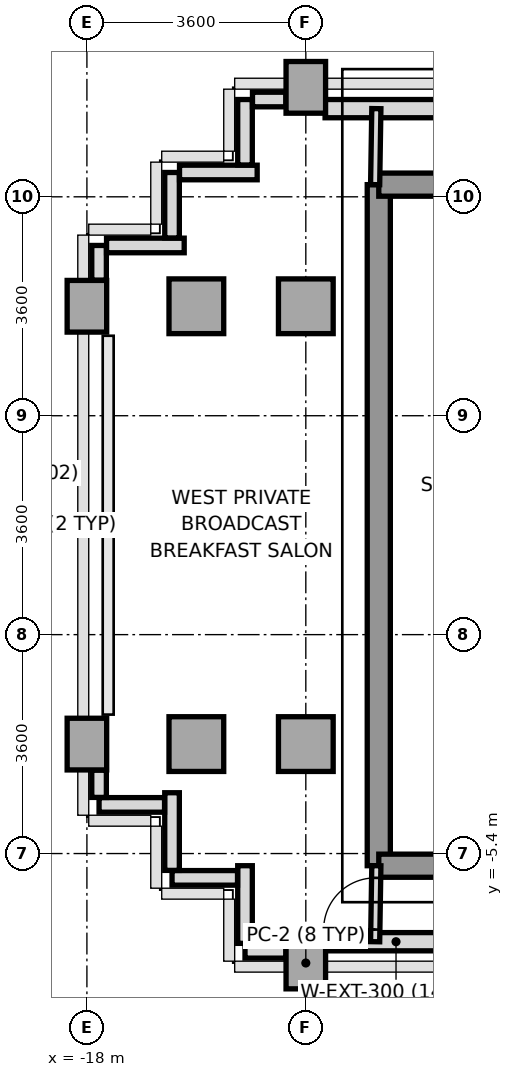
"""IFC4 building model, lengths in metres.
Left out: names, types, materials, properties, quantities, classifications, styles, units other than length and angle.
Written with IfcOpenShell. Run it as: python <this file> out.ifc"""

import sys

from ifc_helpers import new_model, si_unit, direction, frame, frame_2d, origin, origin_2d, place, context, subcontext, project, spatial, rectangle, extrude, source, transform, mapped, element, fill, save


model = new_model("IFC4")
c1 = context("Model", 3, precision=1e-05, world=origin(), true_north=direction((0.0, 1.0)))
c2 = subcontext(c1, "Body", "Model", "MODEL_VIEW")
j1 = project(units=[si_unit("LENGTHUNIT", "METRE"), si_unit("PLANEANGLEUNIT", "RADIAN")], contexts=[c1])
p1 = place(None, origin())
s1 = spatial("IfcSite", under=j1, at=p1, CompositionType="ELEMENT")
p2 = place(p1, origin())
s2 = spatial("IfcBuilding", under=s1, at=p2, CompositionType="ELEMENT")
p3 = place(p2, frame((0.0, 0.0, 201.2)))
s3 = spatial("IfcBuildingStorey", under=s2, at=p3, CompositionType="ELEMENT", Elevation=201.2)
m1 = source(origin(), c2, "Body", "SweptSolid", [
    extrude(rectangle(XDim=0.65, YDim=0.85, at=origin_2d()), origin(), (0.0, 0.0, 1.0), 3.2),
])
for number, where, z_axis, x_axis in (
    (1, (-18.0, -3.6, 0.0), (0.0, 0.0, 1.0), (1.0, 0.0, 0.0)),
    (2, (-18.0, 3.6, 0.0), (0.0, 0.0, 1.0), (1.0, 0.0, 0.0)),
):
    element("IfcColumn", number, at=place(p3, frame(where, z_axis=z_axis, x_axis=x_axis)), inside=s3, PredefinedType="COLUMN", context=c2, shape_type="MappedRepresentation", body=[
        mapped(m1, transform((0.0, 0.0, 0.0), x_axis=(1.0, 0.0, 0.0), y_axis=(0.0, 1.0, 0.0), z_axis=(0.0, 0.0, 1.0), scale=1.0)),
    ])
m2 = source(origin(), c2, "Body", "SweptSolid", [
    extrude(rectangle(XDim=0.9, YDim=0.9, at=origin_2d()), origin(), (0.0, 0.0, 1.0), 3.2),
])
for number, where, z_axis, x_axis in (
    (3, (-16.2, -3.6, 0.0), (0.0, 0.0, 1.0), (1.0, 0.0, 0.0)),
    (4, (-16.2, 3.6, 0.0), (0.0, 0.0, 1.0), (1.0, 0.0, 0.0)),
):
    element("IfcColumn", number, at=place(p3, frame(where, z_axis=z_axis, x_axis=x_axis)), inside=s3, PredefinedType="COLUMN", context=c2, shape_type="MappedRepresentation", body=[
        mapped(m2, transform((0.0, 0.0, 0.0), x_axis=(1.0, 0.0, 0.0), y_axis=(0.0, 1.0, 0.0), z_axis=(0.0, 0.0, 1.0), scale=1.0)),
    ])
p4 = place(p3, frame((-14.4, -7.2, 0.0), z_axis=(0.0, 0.0, 1.0), x_axis=(1.0, 0.0, 0.0)))
e5 = element("IfcColumn", 5, at=p4, inside=s3, PredefinedType="COLUMN", context=c2, shape_type="MappedRepresentation", body=[
    mapped(m1, transform((0.0, 0.0, 0.0), x_axis=(1.0, 0.0, 0.0), y_axis=(0.0, 1.0, 0.0), z_axis=(0.0, 0.0, 1.0), scale=1.0)),
])
for number, where, z_axis, x_axis in (
    (6, (-14.4, -3.6, 0.0), (0.0, 0.0, 1.0), (1.0, 0.0, 0.0)),
    (7, (-14.4, 3.6, 0.0), (0.0, 0.0, 1.0), (1.0, 0.0, 0.0)),
):
    element("IfcColumn", number, at=place(p3, frame(where, z_axis=z_axis, x_axis=x_axis)), inside=s3, PredefinedType="COLUMN", context=c2, shape_type="MappedRepresentation", body=[
        mapped(m2, transform((0.0, 0.0, 0.0), x_axis=(1.0, 0.0, 0.0), y_axis=(0.0, 1.0, 0.0), z_axis=(0.0, 0.0, 1.0), scale=1.0)),
    ])
p5 = place(p3, frame((-14.4, 7.2, 0.0), z_axis=(0.0, 0.0, 1.0), x_axis=(1.0, 0.0, 0.0)))
e8 = element("IfcColumn", 8, at=p5, inside=s3, PredefinedType="COLUMN", context=c2, shape_type="MappedRepresentation", body=[
    mapped(m1, transform((0.0, 0.0, 0.0), x_axis=(1.0, 0.0, 0.0), y_axis=(0.0, 1.0, 0.0), z_axis=(0.0, 0.0, 1.0), scale=1.0)),
])
p6 = place(p3, frame((-14.083, 6.85, 0.0), z_axis=(0.0, 0.0, 1.0), x_axis=(1.0, 0.0, 0.0)))
e9 = element("IfcWall", 9, at=p6, inside=s3, PredefinedType="SOLIDWALL", context=c2, shape_type="SweptSolid", body=[
    extrude(rectangle(XDim=2.635, YDim=0.3, at=frame_2d((1.317, 0.0))), origin(), (0.0, 0.0, 1.0), 3.2),
])
p7 = place(p3, frame((-14.083, -6.85, 0.0), z_axis=(0.0, 0.0, 1.0), x_axis=(1.0, 0.0, 0.0)))
e10 = element("IfcWall", 10, at=p7, inside=s3, PredefinedType="SOLIDWALL", context=c2, shape_type="SweptSolid", body=[
    extrude(rectangle(XDim=2.333, YDim=0.3, at=frame_2d((1.167, 0.0))), origin(), (0.0, 0.0, 1.0), 3.2),
])
p8 = place(p3, frame((-14.728, -7.0, 0.0), z_axis=(0.0, 0.0, 1.0), x_axis=(-1.0, 0.0, 0.0)))
e11 = element("IfcWall", 11, at=p8, inside=s3, PredefinedType="PARAPET", context=c2, shape_type="SweptSolid", body=[
    extrude(rectangle(XDim=0.672, YDim=0.24, at=frame_2d((0.336, 0.0))), origin(), (0.0, 0.0, 1.0), 1.15),
])
p9 = place(p3, frame((-15.4, -6.877, 0.0), z_axis=(0.0, 0.0, 1.0), x_axis=(0.0, 1.0, 0.0)))
e12 = element("IfcWall", 12, at=p9, inside=s3, PredefinedType="PARAPET", context=c2, shape_type="SweptSolid", body=[
    extrude(rectangle(XDim=1.277, YDim=0.24, at=frame_2d((0.638, 0.0))), origin(), (0.0, 0.0, 1.0), 1.15),
])
p10 = place(p3, frame((-15.523, -5.8, 0.0), z_axis=(0.0, 0.0, 1.0), x_axis=(-1.0, 0.0, 0.0)))
e13 = element("IfcWall", 13, at=p10, inside=s3, PredefinedType="PARAPET", context=c2, shape_type="SweptSolid", body=[
    extrude(rectangle(XDim=1.077, YDim=0.24, at=frame_2d((0.539, 0.0))), origin(), (0.0, 0.0, 1.0), 1.15),
])
p11 = place(p3, frame((-16.6, -5.677, 0.0), z_axis=(0.0, 0.0, 1.0), x_axis=(0.0, 1.0, 0.0)))
e14 = element("IfcWall", 14, at=p11, inside=s3, PredefinedType="PARAPET", context=c2, shape_type="SweptSolid", body=[
    extrude(rectangle(XDim=1.277, YDim=0.24, at=frame_2d((0.639, 0.0))), origin(), (0.0, 0.0, 1.0), 1.15),
])
p12 = place(p3, frame((-16.723, -4.6, 0.0), z_axis=(0.0, 0.0, 1.0), x_axis=(-1.0, 0.0, 0.0)))
e15 = element("IfcWall", 15, at=p12, inside=s3, PredefinedType="PARAPET", context=c2, shape_type="SweptSolid", body=[
    extrude(rectangle(XDim=1.077, YDim=0.24, at=frame_2d((0.539, 0.0))), origin(), (0.0, 0.0, 1.0), 1.15),
])
p13 = place(p3, frame((-17.8, -4.477, 0.0), z_axis=(0.0, 0.0, 1.0), x_axis=(0.0, 1.0, 0.0)))
e16 = element("IfcWall", 16, at=p13, inside=s3, PredefinedType="PARAPET", context=c2, shape_type="SweptSolid", body=[
    extrude(rectangle(XDim=0.449, YDim=0.24, at=frame_2d((0.225, 0.0))), origin(), (0.0, 0.0, 1.0), 1.15),
])
p14 = place(p3, frame((-17.8, 4.028, 0.0), z_axis=(0.0, 0.0, 1.0), x_axis=(0.0, 1.0, 0.0)))
e17 = element("IfcWall", 17, at=p14, inside=s3, PredefinedType="PARAPET", context=c2, shape_type="SweptSolid", body=[
    extrude(rectangle(XDim=0.572, YDim=0.24, at=frame_2d((0.286, 0.0))), origin(), (0.0, 0.0, 1.0), 1.15),
])
p15 = place(p3, frame((-17.677, 4.6, 0.0), z_axis=(0.0, 0.0, 1.0), x_axis=(1.0, 0.0, 0.0)))
e18 = element("IfcWall", 18, at=p15, inside=s3, PredefinedType="PARAPET", context=c2, shape_type="SweptSolid", body=[
    extrude(rectangle(XDim=1.277, YDim=0.24, at=frame_2d((0.639, 0.0))), origin(), (0.0, 0.0, 1.0), 1.15),
])
p16 = place(p3, frame((-16.6, 4.723, 0.0), z_axis=(0.0, 0.0, 1.0), x_axis=(0.0, 1.0, 0.0)))
e19 = element("IfcWall", 19, at=p16, inside=s3, PredefinedType="PARAPET", context=c2, shape_type="SweptSolid", body=[
    extrude(rectangle(XDim=1.077, YDim=0.24, at=frame_2d((0.539, 0.0))), origin(), (0.0, 0.0, 1.0), 1.15),
])
p17 = place(p3, frame((-16.477, 5.8, 0.0), z_axis=(0.0, 0.0, 1.0), x_axis=(1.0, 0.0, 0.0)))
e20 = element("IfcWall", 20, at=p17, inside=s3, PredefinedType="PARAPET", context=c2, shape_type="SweptSolid", body=[
    extrude(rectangle(XDim=1.277, YDim=0.24, at=frame_2d((0.639, 0.0))), origin(), (0.0, 0.0, 1.0), 1.15),
])
p18 = place(p3, frame((-15.4, 5.923, 0.0), z_axis=(0.0, 0.0, 1.0), x_axis=(0.0, 1.0, 0.0)))
e21 = element("IfcWall", 21, at=p18, inside=s3, PredefinedType="PARAPET", context=c2, shape_type="SweptSolid", body=[
    extrude(rectangle(XDim=1.077, YDim=0.24, at=frame_2d((0.539, 0.0))), origin(), (0.0, 0.0, 1.0), 1.15),
])
p19 = place(p3, frame((-15.277, 7.0, 0.0), z_axis=(0.0, 0.0, 1.0), x_axis=(1.0, 0.0, 0.0)))
e22 = element("IfcWall", 22, at=p19, inside=s3, PredefinedType="PARAPET", context=c2, shape_type="SweptSolid", body=[
    extrude(rectangle(XDim=0.549, YDim=0.24, at=frame_2d((0.274, 0.0))), origin(), (0.0, 0.0, 1.0), 1.15),
])
p20 = place(p3, frame((-13.2, -5.6, 0.0), z_axis=(0.0, 0.0, 1.0), x_axis=(0.0, 1.0, 0.0)))
e23 = element("IfcWall", 23, at=p20, inside=s3, PredefinedType="SHEAR", context=c2, shape_type="SweptSolid", body=[
    extrude(rectangle(XDim=11.2, YDim=0.38, at=frame_2d((5.6, 0.0))), origin(), (0.0, 0.0, 1.0), 3.2),
])
p21 = place(p3, frame((-13.2, 5.6, 0.0), z_axis=(0.0, 0.0, 1.0), x_axis=(1.0, 0.0, 0.0)))
e24 = element("IfcWall", 24, at=p21, inside=s3, PredefinedType="SHEAR", context=c2, shape_type="SweptSolid", body=[
    extrude(rectangle(XDim=1.844, YDim=0.38, at=frame_2d((0.922, 0.0))), origin(), (0.0, 0.0, 1.0), 3.2),
])
p22 = place(p3, frame((-13.2, -5.6, 0.0), z_axis=(0.0, 0.0, 1.0), x_axis=(1.0, 0.0, 0.0)))
e25 = element("IfcWall", 25, at=p22, inside=s3, PredefinedType="SHEAR", context=c2, shape_type="SweptSolid", body=[
    extrude(rectangle(XDim=7.8, YDim=0.38, at=frame_2d((3.9, 0.0))), origin(), (0.0, 0.0, 1.0), 3.2),
])
p23 = place(p3, frame((-13.26, 5.6, 0.0), z_axis=(0.0, 0.0, 1.0), x_axis=(0.016013571389, 0.999871774545, 0.0)))
e26 = element("IfcWall", 26, at=p23, inside=s3, PredefinedType="PARTITIONING", context=c2, shape_type="SweptSolid", body=[
    extrude(rectangle(XDim=1.25, YDim=0.15, at=frame_2d((0.625, 0.0))), origin(), (0.0, 0.0, 1.0), 3.2),
])
p24 = place(p3, frame((-13.26, -6.85, 0.0), z_axis=(0.0, 0.0, 1.0), x_axis=(0.016013571389, 0.999871774545, 0.0)))
e27 = element("IfcWall", 27, at=p24, inside=s3, PredefinedType="PARTITIONING", context=c2, shape_type="SweptSolid", body=[
    extrude(rectangle(XDim=1.25, YDim=0.15, at=frame_2d((0.625, 0.0))), origin(), (0.0, 0.0, 1.0), 3.2),
])
p25 = place(p24, frame((0.2, 0.0, 0.0)))
e28 = element("IfcOpeningElement", 28, at=p25, cuts=e27, PredefinedType="OPENING", context=c2, shape_type="SweptSolid", body=[
    extrude(rectangle(XDim=0.85, YDim=2.1, at=frame_2d((0.425, 1.05))), frame((0.0, 0.085, 0.0), z_axis=(0.0, -1.0, 0.0), x_axis=(1.0, 0.0, 0.0)), (0.0, 0.0, 1.0), 0.17),
])
m3 = source(origin(), c2, "Body", "SweptSolid", [
    extrude(rectangle(XDim=0.85, YDim=2.1, at=frame_2d((0.425, 1.05))), frame((0.0, 0.025, 0.0), z_axis=(0.0, -1.0, 0.0), x_axis=(1.0, 0.0, 0.0)), (0.0, 0.0, 1.0), 0.05),
])
p26 = place(p25, origin())
e29 = element("IfcDoor", 29, at=p26, inside=s3, OperationType="SINGLE_SWING_LEFT", PredefinedType="DOOR", context=c2, shape_type="MappedRepresentation", body=[
    mapped(m3, transform((0.0, 0.0, 0.0), x_axis=(1.0, 0.0, 0.0), y_axis=(0.0, 1.0, 0.0), z_axis=(0.0, 0.0, 1.0), scale=1.0)),
])
fill(e28, e29)
save(model, sys.argv[1])
